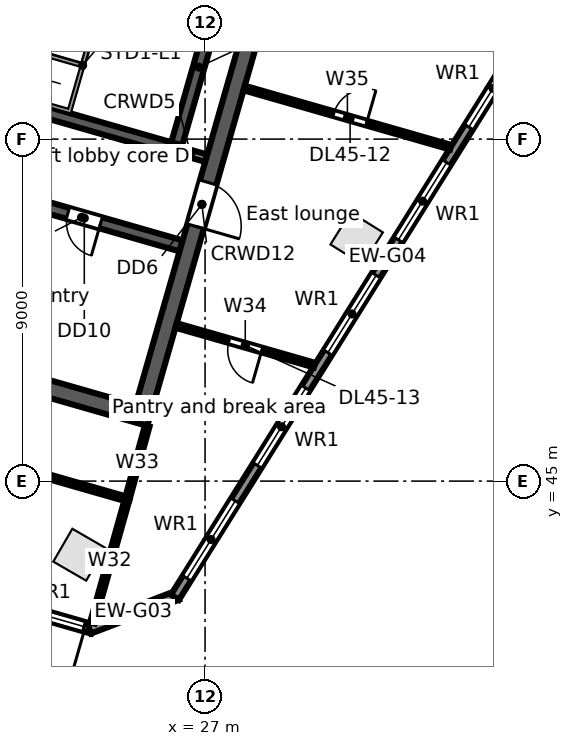
"""IFC4 building model, lengths in metres.
Left out: names, types, materials, properties, quantities, classifications, styles, units other than length and angle.
Written with IfcOpenShell. Run it as: python <this file> out.ifc"""

import sys

from ifc_helpers import new_model, si_unit, direction, frame, frame_2d, origin, origin_2d, place, context, subcontext, project, spatial, rectangle, extrude, element, fill, save


model = new_model("IFC4")
c1 = context("Model", 3, precision=1e-05, world=origin(), true_north=direction((0.0, 1.0)))
c2 = subcontext(c1, "Body", "Model", "MODEL_VIEW")
j1 = project(units=[si_unit("LENGTHUNIT", "METRE"), si_unit("PLANEANGLEUNIT", "RADIAN")], contexts=[c1])
p1 = place(None, origin())
s1 = spatial("IfcSite", under=j1, at=p1, CompositionType="ELEMENT")
p2 = place(p1, origin())
s2 = spatial("IfcBuilding", under=s1, at=p2, CompositionType="ELEMENT")
p3 = place(p2, frame((0.0, 0.0, 211.4)))
s3 = spatial("IfcBuildingStorey", under=s2, at=p3, CompositionType="ELEMENT", Elevation=211.4)
for number, where, z_axis, x_axis in (
    (1, (23.69, 43.063, 0.0), (0.0, 0.0, 1.0), (-0.865, 0.501, 0.0)),
    (2, (30.99, 51.386, 0.0), (0.0, 0.0, 1.0), (0.53, 0.848, 0.0)),
):
    element("IfcColumn", number, at=place(p3, frame(where, z_axis=z_axis, x_axis=x_axis)), inside=s3, PredefinedType="COLUMN", context=c2, shape_type="SweptSolid", body=[
        extrude(rectangle(XDim=1.0, YDim=1.0, at=origin_2d()), origin(), (0.0, 0.0, 1.0), 3.9),
    ])
p4 = place(p3, frame((24.034, 41.108, 0.0), z_axis=(0.0, 0.0, 1.0), x_axis=(-0.96126060691, 0.275641153683, 0.0)))
e3 = element("IfcWall", 3, at=p4, inside=s3, PredefinedType="STANDARD", context=c2, shape_type="SweptSolid", body=[
    extrude(rectangle(XDim=24.951, YDim=0.25, at=frame_2d((12.475, 0.0))), origin(), (0.0, 0.0, 1.0), 3.62),
])
p5 = place(p4, frame((22.416, 0.0, 0.8)))
e4 = element("IfcOpeningElement", 4, at=p5, cuts=e3, PredefinedType="OPENING", context=c2, shape_type="SweptSolid", body=[
    extrude(rectangle(XDim=2.4, YDim=2.2, at=frame_2d((1.2, 1.1))), frame((0.0, 0.135, 0.0), z_axis=(0.0, -1.0, 0.0), x_axis=(1.0, 0.0, 0.0)), (0.0, 0.0, 1.0), 0.27),
])
p6 = place(p4, frame((19.643, 0.0, 0.8)))
e5 = element("IfcOpeningElement", 5, at=p6, cuts=e3, PredefinedType="OPENING", context=c2, shape_type="SweptSolid", body=[
    extrude(rectangle(XDim=2.4, YDim=2.2, at=frame_2d((1.2, 1.1))), frame((0.0, 0.135, 0.0), z_axis=(0.0, -1.0, 0.0), x_axis=(1.0, 0.0, 0.0)), (0.0, 0.0, 1.0), 0.27),
])
p7 = place(p4, frame((16.869, 0.0, 0.8)))
e6 = element("IfcOpeningElement", 6, at=p7, cuts=e3, PredefinedType="OPENING", context=c2, shape_type="SweptSolid", body=[
    extrude(rectangle(XDim=2.4, YDim=2.2, at=frame_2d((1.2, 1.1))), frame((0.0, 0.135, 0.0), z_axis=(0.0, -1.0, 0.0), x_axis=(1.0, 0.0, 0.0)), (0.0, 0.0, 1.0), 0.27),
])
p8 = place(p4, frame((14.096, 0.0, 0.8)))
e7 = element("IfcOpeningElement", 7, at=p8, cuts=e3, PredefinedType="OPENING", context=c2, shape_type="SweptSolid", body=[
    extrude(rectangle(XDim=2.4, YDim=2.2, at=frame_2d((1.2, 1.1))), frame((0.0, 0.135, 0.0), z_axis=(0.0, -1.0, 0.0), x_axis=(1.0, 0.0, 0.0)), (0.0, 0.0, 1.0), 0.27),
])
p9 = place(p4, frame((11.622, 0.0, 0.0)))
e8 = element("IfcOpeningElement", 8, at=p9, cuts=e3, PredefinedType="OPENING", context=c2, shape_type="SweptSolid", body=[
    extrude(rectangle(XDim=1.8, YDim=2.4, at=frame_2d((0.9, 1.2))), frame((0.0, 0.135, 0.0), z_axis=(0.0, -1.0, 0.0), x_axis=(1.0, 0.0, 0.0)), (0.0, 0.0, 1.0), 0.27),
])
p10 = place(p4, frame((8.549, 0.0, 0.8)))
e9 = element("IfcOpeningElement", 9, at=p10, cuts=e3, PredefinedType="OPENING", context=c2, shape_type="SweptSolid", body=[
    extrude(rectangle(XDim=2.4, YDim=2.2, at=frame_2d((1.2, 1.1))), frame((0.0, 0.135, 0.0), z_axis=(0.0, -1.0, 0.0), x_axis=(1.0, 0.0, 0.0)), (0.0, 0.0, 1.0), 0.27),
])
p11 = place(p4, frame((5.775, 0.0, 0.8)))
e10 = element("IfcOpeningElement", 10, at=p11, cuts=e3, PredefinedType="OPENING", context=c2, shape_type="SweptSolid", body=[
    extrude(rectangle(XDim=2.4, YDim=2.2, at=frame_2d((1.2, 1.1))), frame((0.0, 0.135, 0.0), z_axis=(0.0, -1.0, 0.0), x_axis=(1.0, 0.0, 0.0)), (0.0, 0.0, 1.0), 0.27),
])
p12 = place(p4, frame((3.302, 0.0, 0.0)))
e11 = element("IfcOpeningElement", 11, at=p12, cuts=e3, PredefinedType="OPENING", context=c2, shape_type="SweptSolid", body=[
    extrude(rectangle(XDim=1.8, YDim=2.4, at=frame_2d((0.9, 1.2))), frame((0.0, 0.135, 0.0), z_axis=(0.0, -1.0, 0.0), x_axis=(1.0, 0.0, 0.0)), (0.0, 0.0, 1.0), 0.27),
])
p13 = place(p4, frame((0.229, 0.0, 0.8)))
e12 = element("IfcOpeningElement", 12, at=p13, cuts=e3, PredefinedType="OPENING", context=c2, shape_type="SweptSolid", body=[
    extrude(rectangle(XDim=2.4, YDim=2.2, at=frame_2d((1.2, 1.1))), frame((0.0, 0.135, 0.0), z_axis=(0.0, -1.0, 0.0), x_axis=(1.0, 0.0, 0.0)), (0.0, 0.0, 1.0), 0.27),
])
p14 = place(p3, frame((26.27, 41.993, 0.0), z_axis=(0.0, 0.0, 1.0), x_axis=(-0.933573798066, -0.358385216722, 0.0)))
e13 = element("IfcWall", 13, at=p14, inside=s3, PredefinedType="STANDARD", context=c2, shape_type="SweptSolid", body=[
    extrude(rectangle(XDim=2.48, YDim=0.25, at=frame_2d((1.24, 0.0))), origin(), (0.0, 0.0, 1.0), 3.62),
])
p15 = place(p3, frame((37.392, 59.84, 0.0), z_axis=(0.0, 0.0, 1.0), x_axis=(-0.529919909431, -0.848047692992, 0.0)))
e14 = element("IfcWall", 14, at=p15, inside=s3, PredefinedType="STANDARD", context=c2, shape_type="SweptSolid", body=[
    extrude(rectangle(XDim=21.104, YDim=0.25, at=frame_2d((10.552, 0.0))), origin(), (0.0, 0.0, 1.0), 3.62),
])
p16 = place(p15, frame((18.112, 0.0, 0.8)))
e15 = element("IfcOpeningElement", 15, at=p16, cuts=e14, PredefinedType="OPENING", context=c2, shape_type="SweptSolid", body=[
    extrude(rectangle(XDim=2.4, YDim=2.2, at=frame_2d((1.2, 1.1))), frame((0.0, 0.135, 0.0), z_axis=(0.0, -1.0, 0.0), x_axis=(1.0, 0.0, 0.0)), (0.0, 0.0, 1.0), 0.27),
])
p17 = place(p15, frame((14.612, 0.0, 0.8)))
e16 = element("IfcOpeningElement", 16, at=p17, cuts=e14, PredefinedType="OPENING", context=c2, shape_type="SweptSolid", body=[
    extrude(rectangle(XDim=2.4, YDim=2.2, at=frame_2d((1.2, 1.1))), frame((0.0, 0.135, 0.0), z_axis=(0.0, -1.0, 0.0), x_axis=(1.0, 0.0, 0.0)), (0.0, 0.0, 1.0), 0.27),
])
p18 = place(p15, frame((11.112, 0.0, 0.8)))
e17 = element("IfcOpeningElement", 17, at=p18, cuts=e14, PredefinedType="OPENING", context=c2, shape_type="SweptSolid", body=[
    extrude(rectangle(XDim=2.4, YDim=2.2, at=frame_2d((1.2, 1.1))), frame((0.0, 0.135, 0.0), z_axis=(0.0, -1.0, 0.0), x_axis=(1.0, 0.0, 0.0)), (0.0, 0.0, 1.0), 0.27),
])
p19 = place(p15, frame((7.612, 0.0, 0.8)))
e18 = element("IfcOpeningElement", 18, at=p19, cuts=e14, PredefinedType="OPENING", context=c2, shape_type="SweptSolid", body=[
    extrude(rectangle(XDim=2.4, YDim=2.2, at=frame_2d((1.2, 1.1))), frame((0.0, 0.135, 0.0), z_axis=(0.0, -1.0, 0.0), x_axis=(1.0, 0.0, 0.0)), (0.0, 0.0, 1.0), 0.27),
])
p20 = place(p15, frame((4.112, 0.0, 0.8)))
e19 = element("IfcOpeningElement", 19, at=p20, cuts=e14, PredefinedType="OPENING", context=c2, shape_type="SweptSolid", body=[
    extrude(rectangle(XDim=2.4, YDim=2.2, at=frame_2d((1.2, 1.1))), frame((0.0, 0.135, 0.0), z_axis=(0.0, -1.0, 0.0), x_axis=(1.0, 0.0, 0.0)), (0.0, 0.0, 1.0), 0.27),
])
p21 = place(p15, frame((0.612, 0.0, 0.8)))
e20 = element("IfcOpeningElement", 20, at=p21, cuts=e14, PredefinedType="OPENING", context=c2, shape_type="SweptSolid", body=[
    extrude(rectangle(XDim=2.4, YDim=2.2, at=frame_2d((1.2, 1.1))), frame((0.0, 0.135, 0.0), z_axis=(0.0, -1.0, 0.0), x_axis=(1.0, 0.0, 0.0)), (0.0, 0.0, 1.0), 0.27),
])
p22 = place(p3, frame((16.89, 49.149, 0.0), z_axis=(0.0, 0.0, 1.0), x_axis=(0.96126248289, -0.275634611374, 0.0)))
e21 = element("IfcWall", 21, at=p22, inside=s3, PredefinedType="SOLIDWALL", context=c2, shape_type="SweptSolid", body=[
    extrude(rectangle(XDim=9.0, YDim=0.45, at=frame_2d((4.5, 0.0))), origin(), (0.0, 0.0, 1.0), 3.62),
])
p23 = place(p3, frame((21.131, 52.692, 0.0), z_axis=(0.0, 0.0, 1.0), x_axis=(0.961261488075, -0.275638080722, 0.0)))
e22 = element("IfcWall", 22, at=p23, inside=s3, PredefinedType="SOLIDWALL", context=c2, shape_type="SweptSolid", body=[
    extrude(rectangle(XDim=5.45, YDim=0.3, at=frame_2d((2.725, 0.0))), origin(), (0.0, 0.0, 1.0), 3.62),
])
p24 = place(p23, frame((2.35, 0.0, 0.0)))
e23 = element("IfcOpeningElement", 23, at=p24, cuts=e22, PredefinedType="OPENING", context=c2, shape_type="SweptSolid", body=[
    extrude(rectangle(XDim=0.9, YDim=2.1, at=frame_2d((0.45, 1.05))), frame((0.0, 0.16, 0.0), z_axis=(0.0, -1.0, 0.0), x_axis=(1.0, 0.0, 0.0)), (0.0, 0.0, 1.0), 0.32),
])
p25 = place(p3, frame((19.245, 55.73, 0.0), z_axis=(0.0, 0.0, 1.0), x_axis=(0.961263007877, -0.275632780503, 0.0)))
e24 = element("IfcWall", 24, at=p25, inside=s3, PredefinedType="SOLIDWALL", context=c2, shape_type="SweptSolid", body=[
    extrude(rectangle(XDim=7.25, YDim=0.3, at=frame_2d((3.625, 0.0))), origin(), (0.0, 0.0, 1.0), 3.62),
])
p26 = place(p25, frame((0.35, 0.0, 0.0)))
e25 = element("IfcOpeningElement", 25, at=p26, cuts=e24, PredefinedType="OPENING", context=c2, shape_type="SweptSolid", body=[
    extrude(rectangle(XDim=1.0, YDim=2.1, at=frame_2d((0.5, 1.05))), frame((0.0, 0.16, 0.0), z_axis=(0.0, -1.0, 0.0), x_axis=(1.0, 0.0, 0.0)), (0.0, 0.0, 1.0), 0.32),
])
p27 = place(p3, frame((26.214, 53.732, 0.0), z_axis=(0.0, 0.0, 1.0), x_axis=(0.961241665642, -0.275707200184, 0.0)))
e26 = element("IfcWall", 26, at=p27, inside=s3, PredefinedType="SOLIDWALL", context=c2, shape_type="SweptSolid", body=[
    extrude(rectangle(XDim=0.85, YDim=0.2, at=frame_2d((0.425, 0.0))), origin(), (0.0, 0.0, 1.0), 3.62),
])
p28 = place(p3, frame((26.256, 53.876, 0.0), z_axis=(0.0, 0.0, 1.0), x_axis=(0.275588560745, 0.96127568636, 0.0)))
e27 = element("IfcWall", 27, at=p28, inside=s3, PredefinedType="SOLIDWALL", context=c2, shape_type="SweptSolid", body=[
    extrude(rectangle(XDim=4.2, YDim=0.3, at=frame_2d((2.1, 0.0))), origin(), (0.0, 0.0, 1.0), 3.62),
])
p29 = place(p3, frame((25.387, 46.947, 0.0), z_axis=(0.0, 0.0, 1.0), x_axis=(0.275638974822, 0.961261231695, 0.0)))
e28 = element("IfcWall", 28, at=p29, inside=s3, PredefinedType="SOLIDWALL", context=c2, shape_type="SweptSolid", body=[
    extrude(rectangle(XDim=11.1, YDim=0.45, at=frame_2d((5.55, 0.0))), origin(), (0.0, 0.0, 1.0), 3.62),
])
p30 = place(p29, frame((4.95, 0.0, 0.0)))
e29 = element("IfcOpeningElement", 29, at=p30, cuts=e28, PredefinedType="OPENING", context=c2, shape_type="SweptSolid", body=[
    extrude(rectangle(XDim=1.2, YDim=2.1, at=frame_2d((0.6, 1.05))), frame((0.0, 0.235, 0.0), z_axis=(0.0, -1.0, 0.0), x_axis=(1.0, 0.0, 0.0)), (0.0, 0.0, 1.0), 0.47),
])
p31 = place(p3, frame((14.377, 47.555, 0.0), z_axis=(0.0, 0.0, 1.0), x_axis=(0.961263044958, -0.275632651182, 0.0)))
e30 = element("IfcWall", 30, at=p31, inside=s3, PredefinedType="PARTITIONING", context=c2, shape_type="SweptSolid", body=[
    extrude(rectangle(XDim=11.0, YDim=0.125, at=frame_2d((5.5, 0.0))), origin(), (0.0, 0.0, 1.0), 2.9),
])
p32 = place(p31, frame((4.95, 0.0, 0.0)))
e31 = element("IfcOpeningElement", 31, at=p32, cuts=e30, PredefinedType="OPENING", context=c2, shape_type="SweptSolid", body=[
    extrude(rectangle(XDim=0.9, YDim=2.1, at=frame_2d((0.45, 1.05))), frame((0.0, 0.073, 0.0), z_axis=(0.0, -1.0, 0.0), x_axis=(1.0, 0.0, 0.0)), (0.0, 0.0, 1.0), 0.145),
])
p33 = place(p3, frame((24.036, 41.27, 0.0), z_axis=(0.0, 0.0, 1.0), x_axis=(0.270787421954, 0.962639170256, 0.0)))
e32 = element("IfcWall", 32, at=p33, inside=s3, PredefinedType="PARTITIONING", context=c2, shape_type="SweptSolid", body=[
    extrude(rectangle(XDim=3.379, YDim=0.125, at=frame_2d((1.689, 0.0))), origin(), (0.0, 0.0, 1.0), 2.9),
])
p34 = place(p3, frame((24.951, 44.523, 0.0), z_axis=(0.0, 0.0, 1.0), x_axis=(0.264046927145, 0.964509834198, 0.0)))
e33 = element("IfcWall", 33, at=p34, inside=s3, PredefinedType="PARTITIONING", context=c2, shape_type="SweptSolid", body=[
    extrude(rectangle(XDim=2.0, YDim=0.125, at=frame_2d((1.0, 0.0))), origin(), (0.0, 0.0, 1.0), 2.9),
])
p35 = place(p3, frame((26.237, 49.096, 0.0), z_axis=(0.0, 0.0, 1.0), x_axis=(0.961285271066, -0.275555126304, 0.0)))
e34 = element("IfcWall", 34, at=p35, inside=s3, PredefinedType="PARTITIONING", context=c2, shape_type="SweptSolid", body=[
    extrude(rectangle(XDim=3.789, YDim=0.125, at=frame_2d((1.894, 0.0))), origin(), (0.0, 0.0, 1.0), 2.9),
])
p36 = place(p35, frame((1.45, 0.0, 0.0)))
e35 = element("IfcOpeningElement", 35, at=p36, cuts=e34, PredefinedType="OPENING", context=c2, shape_type="SweptSolid", body=[
    extrude(rectangle(XDim=0.9, YDim=2.1, at=frame_2d((0.45, 1.05))), frame((0.0, 0.073, 0.0), z_axis=(0.0, -1.0, 0.0), x_axis=(1.0, 0.0, 0.0)), (0.0, 0.0, 1.0), 0.145),
])
p37 = place(p3, frame((28.029, 55.344, 0.0), z_axis=(0.0, 0.0, 1.0), x_axis=(0.961249621014, -0.275679462603, 0.0)))
e36 = element("IfcWall", 36, at=p37, inside=s3, PredefinedType="PARTITIONING", context=c2, shape_type="SweptSolid", body=[
    extrude(rectangle(XDim=5.652, YDim=0.125, at=frame_2d((2.826, 0.0))), origin(), (0.0, 0.0, 1.0), 2.988),
])
p38 = place(p37, frame((2.45, 0.0, 0.0)))
e37 = element("IfcOpeningElement", 37, at=p38, cuts=e36, PredefinedType="OPENING", context=c2, shape_type="SweptSolid", body=[
    extrude(rectangle(XDim=0.9, YDim=2.1, at=frame_2d((0.45, 1.05))), frame((0.0, 0.073, 0.0), z_axis=(0.0, -1.0, 0.0), x_axis=(1.0, 0.0, 0.0)), (0.0, 0.0, 1.0), 0.145),
])
p39 = place(p13, origin())
e38 = element("IfcWindow", 38, at=p39, inside=s3, PartitioningType="SINGLE_PANEL", PredefinedType="WINDOW", context=c2, shape_type="SweptSolid", body=[
    extrude(rectangle(XDim=2.4, YDim=2.2, at=frame_2d((1.2, 1.1))), frame((0.0, 0.03, 0.0), z_axis=(0.0, -1.0, 0.0), x_axis=(1.0, 0.0, 0.0)), (0.0, 0.0, 1.0), 0.06),
])
fill(e12, e38)
p40 = place(p16, origin())
e39 = element("IfcWindow", 39, at=p40, inside=s3, PartitioningType="SINGLE_PANEL", PredefinedType="WINDOW", context=c2, shape_type="SweptSolid", body=[
    extrude(rectangle(XDim=2.4, YDim=2.2, at=frame_2d((1.2, 1.1))), frame((0.0, 0.03, 0.0), z_axis=(0.0, -1.0, 0.0), x_axis=(1.0, 0.0, 0.0)), (0.0, 0.0, 1.0), 0.06),
])
fill(e15, e39)
p41 = place(p17, origin())
e40 = element("IfcWindow", 40, at=p41, inside=s3, PartitioningType="SINGLE_PANEL", PredefinedType="WINDOW", context=c2, shape_type="SweptSolid", body=[
    extrude(rectangle(XDim=2.4, YDim=2.2, at=frame_2d((1.2, 1.1))), frame((0.0, 0.03, 0.0), z_axis=(0.0, -1.0, 0.0), x_axis=(1.0, 0.0, 0.0)), (0.0, 0.0, 1.0), 0.06),
])
fill(e16, e40)
p42 = place(p18, origin())
e41 = element("IfcWindow", 41, at=p42, inside=s3, PartitioningType="SINGLE_PANEL", PredefinedType="WINDOW", context=c2, shape_type="SweptSolid", body=[
    extrude(rectangle(XDim=2.4, YDim=2.2, at=frame_2d((1.2, 1.1))), frame((0.0, 0.03, 0.0), z_axis=(0.0, -1.0, 0.0), x_axis=(1.0, 0.0, 0.0)), (0.0, 0.0, 1.0), 0.06),
])
fill(e17, e41)
p43 = place(p19, origin())
e42 = element("IfcWindow", 42, at=p43, inside=s3, PartitioningType="SINGLE_PANEL", PredefinedType="WINDOW", context=c2, shape_type="SweptSolid", body=[
    extrude(rectangle(XDim=2.4, YDim=2.2, at=frame_2d((1.2, 1.1))), frame((0.0, 0.03, 0.0), z_axis=(0.0, -1.0, 0.0), x_axis=(1.0, 0.0, 0.0)), (0.0, 0.0, 1.0), 0.06),
])
fill(e18, e42)
p44 = place(p20, origin())
e43 = element("IfcWindow", 43, at=p44, inside=s3, PartitioningType="SINGLE_PANEL", PredefinedType="WINDOW", context=c2, shape_type="SweptSolid", body=[
    extrude(rectangle(XDim=2.4, YDim=2.2, at=frame_2d((1.2, 1.1))), frame((0.0, 0.03, 0.0), z_axis=(0.0, -1.0, 0.0), x_axis=(1.0, 0.0, 0.0)), (0.0, 0.0, 1.0), 0.06),
])
fill(e19, e43)
p45 = place(p30, frame((1.2, 0.0, 0.0), z_axis=(0.0, 0.0, 1.0), x_axis=(-1.0, 0.0, 0.0)))
e44 = element("IfcDoor", 44, at=p45, inside=s3, OperationType="SINGLE_SWING_RIGHT", PredefinedType="DOOR", context=c2, shape_type="SweptSolid", body=[
    extrude(rectangle(XDim=1.2, YDim=2.1, at=frame_2d((0.6, 1.05))), frame((0.0, 0.025, 0.0), z_axis=(0.0, -1.0, 0.0), x_axis=(1.0, 0.0, 0.0)), (0.0, 0.0, 1.0), 0.05),
])
fill(e29, e44)
p46 = place(p24, frame((0.9, 0.0, 0.0), z_axis=(0.0, 0.0, 1.0), x_axis=(-1.0, 0.0, 0.0)))
e45 = element("IfcDoor", 45, at=p46, inside=s3, OperationType="SINGLE_SWING_LEFT", PredefinedType="DOOR", context=c2, shape_type="SweptSolid", body=[
    extrude(rectangle(XDim=0.9, YDim=2.1, at=frame_2d((0.45, 1.05))), frame((0.0, 0.025, 0.0), z_axis=(0.0, -1.0, 0.0), x_axis=(1.0, 0.0, 0.0)), (0.0, 0.0, 1.0), 0.05),
])
fill(e23, e45)
p47 = place(p38, origin())
e46 = element("IfcDoor", 46, at=p47, inside=s3, OperationType="SINGLE_SWING_RIGHT", PredefinedType="DOOR", context=c2, shape_type="SweptSolid", body=[
    extrude(rectangle(XDim=0.9, YDim=2.1, at=frame_2d((0.45, 1.05))), frame((0.0, 0.025, 0.0), z_axis=(0.0, -1.0, 0.0), x_axis=(1.0, 0.0, 0.0)), (0.0, 0.0, 1.0), 0.05),
])
fill(e37, e46)
p48 = place(p36, frame((0.9, 0.0, 0.0), z_axis=(0.0, 0.0, 1.0), x_axis=(-1.0, 0.0, 0.0)))
e47 = element("IfcDoor", 47, at=p48, inside=s3, OperationType="SINGLE_SWING_LEFT", PredefinedType="DOOR", context=c2, shape_type="SweptSolid", body=[
    extrude(rectangle(XDim=0.9, YDim=2.1, at=frame_2d((0.45, 1.05))), frame((0.0, 0.025, 0.0), z_axis=(0.0, -1.0, 0.0), x_axis=(1.0, 0.0, 0.0)), (0.0, 0.0, 1.0), 0.05),
])
fill(e35, e47)
save(model, sys.argv[1])
